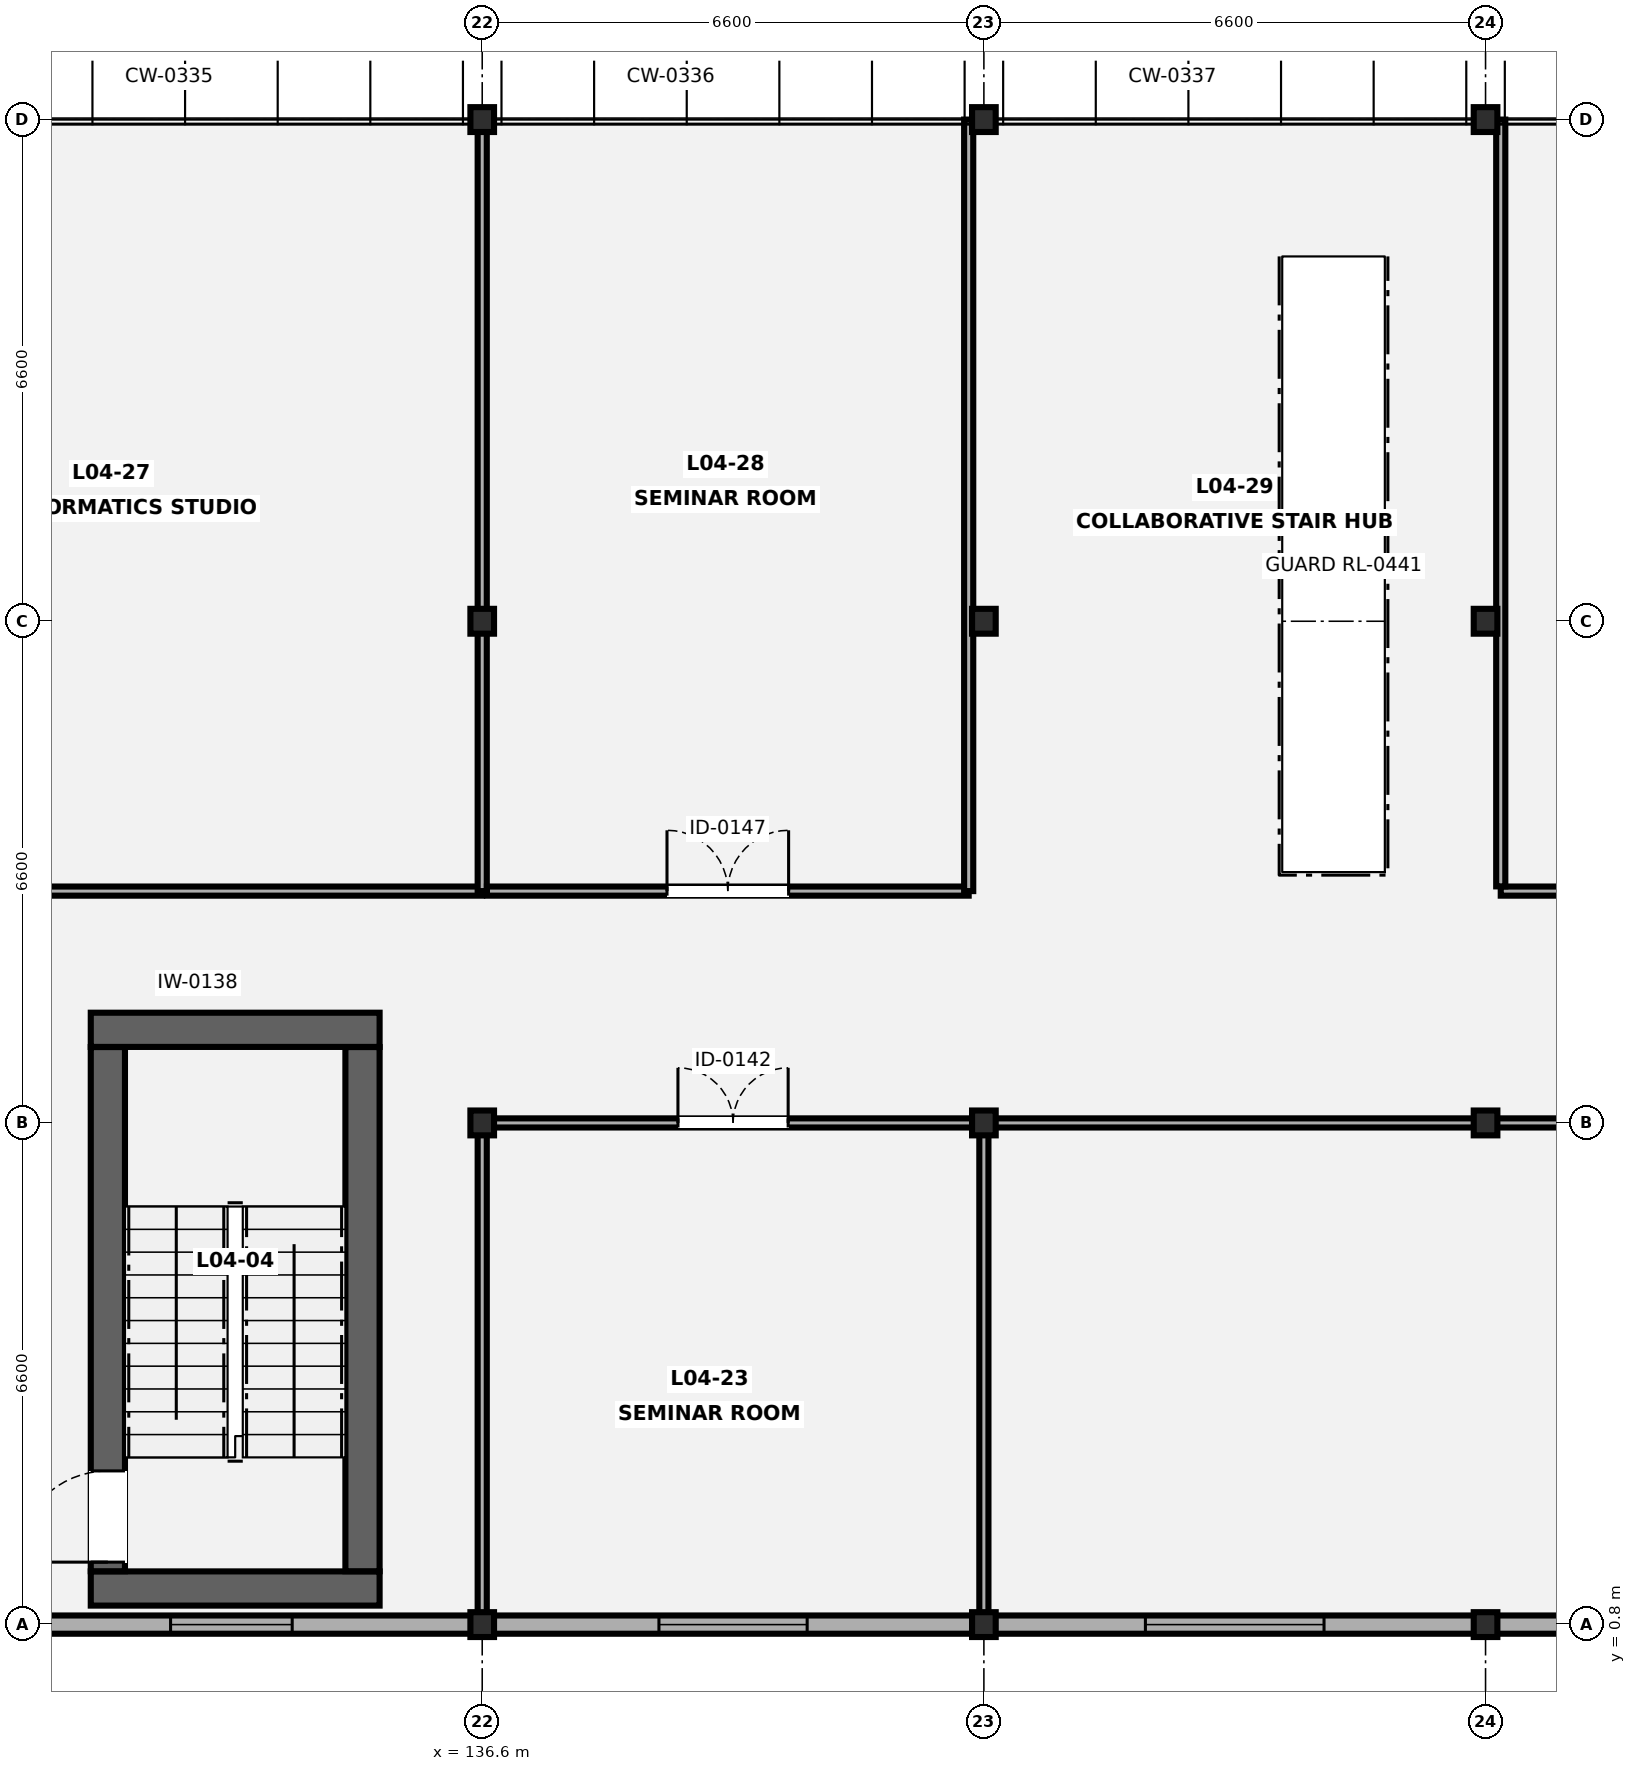
"""IFC4 building model, lengths in metres.
Left out: names, types, materials, properties, quantities, classifications, styles, units other than length and angle.
Written with IfcOpenShell. Run it as: python <this file> out.ifc"""

import sys

from ifc_helpers import new_model, si_unit, direction, frame, frame_2d, origin, origin_2d, place, context, subcontext, project, spatial, rectangle, i_section, extrude, element, fill, save


model = new_model("IFC4")
c1 = context("Model", 3, precision=1e-05, world=origin(), true_north=direction((0.0, 1.0)))
c2 = subcontext(c1, "Body", "Model", "MODEL_VIEW")
j1 = project(units=[si_unit("LENGTHUNIT", "METRE"), si_unit("PLANEANGLEUNIT", "RADIAN")], contexts=[c1])
p1 = place(None, origin())
s1 = spatial("IfcSite", under=j1, at=p1, CompositionType="ELEMENT")
p2 = place(p1, origin())
s2 = spatial("IfcBuilding", under=s1, at=p2, CompositionType="ELEMENT")
p3 = place(p2, frame((0.0, 0.0, 17.5)))
s3 = spatial("IfcBuildingStorey", under=s2, at=p3, CompositionType="ELEMENT", Elevation=17.5)
for number, where, z_axis, x_axis in (
    (1, (136.6, 0.8, 0.0), (0.0, 0.0, 1.0), (1.0, 0.0, 0.0)),
    (2, (136.6, 7.4, 0.0), (0.0, 0.0, 1.0), (1.0, 0.0, 0.0)),
    (3, (136.6, 14.0, 0.0), (0.0, 0.0, 1.0), (1.0, 0.0, 0.0)),
    (4, (136.6, 20.6, 0.0), (0.0, 0.0, 1.0), (1.0, 0.0, 0.0)),
    (5, (143.2, 0.8, 0.0), (0.0, 0.0, 1.0), (1.0, 0.0, 0.0)),
    (6, (143.2, 7.4, 0.0), (0.0, 0.0, 1.0), (1.0, 0.0, 0.0)),
    (7, (143.2, 14.0, 0.0), (0.0, 0.0, 1.0), (1.0, 0.0, 0.0)),
    (8, (143.2, 20.6, 0.0), (0.0, 0.0, 1.0), (1.0, 0.0, 0.0)),
    (9, (149.8, 0.8, 0.0), (0.0, 0.0, 1.0), (1.0, 0.0, 0.0)),
    (10, (149.8, 7.4, 0.0), (0.0, 0.0, 1.0), (1.0, 0.0, 0.0)),
    (11, (149.8, 14.0, 0.0), (0.0, 0.0, 1.0), (1.0, 0.0, 0.0)),
    (12, (149.8, 20.6, 0.0), (0.0, 0.0, 1.0), (1.0, 0.0, 0.0)),
):
    element("IfcColumn", number, at=place(p3, frame(where, z_axis=z_axis, x_axis=x_axis)), inside=s3, PredefinedType="COLUMN", context=c2, shape_type="SweptSolid", body=[
        extrude(i_section(OverallWidth=0.311, OverallDepth=0.327, WebThickness=0.016, FlangeThickness=0.025, FilletRadius=0.017, at=origin_2d()), origin(), (0.0, 0.0, 1.0), 4.2),
    ])
p4 = place(p3, frame((162.046, 0.8, 0.0), z_axis=(0.0, 0.0, 1.0), x_axis=(-1.0, 0.0, 0.0)))
e13 = element("IfcWall", 13, at=p4, inside=s3, PredefinedType="SOLIDWALL", context=c2, shape_type="SweptSolid", body=[
    extrude(rectangle(XDim=58.293, YDim=0.24, at=frame_2d((29.146, 0.0))), origin(), (0.0, 0.0, 1.0), 3.505),
])
p5 = place(p4, frame((53.896, 0.0, 0.85)))
e14 = element("IfcOpeningElement", 14, at=p5, cuts=e13, PredefinedType="OPENING", context=c2, shape_type="SweptSolid", body=[
    extrude(rectangle(XDim=2.5, YDim=1.25, at=frame_2d((1.25, 0.625))), frame((0.0, 0.13, 0.0), z_axis=(0.0, -1.0, 0.0), x_axis=(1.0, 0.0, 0.0)), (0.0, 0.0, 1.0), 0.26),
])
p6 = place(p4, frame((48.096, 0.0, 0.85)))
e15 = element("IfcOpeningElement", 15, at=p6, cuts=e13, PredefinedType="OPENING", context=c2, shape_type="SweptSolid", body=[
    extrude(rectangle(XDim=0.9, YDim=1.35, at=frame_2d((0.45, 0.675))), frame((0.0, 0.13, 0.0), z_axis=(0.0, -1.0, 0.0), x_axis=(1.0, 0.0, 0.0)), (0.0, 0.0, 1.0), 0.26),
])
p7 = place(p4, frame((41.421, 0.0, 0.85)))
e16 = element("IfcOpeningElement", 16, at=p7, cuts=e13, PredefinedType="OPENING", context=c2, shape_type="SweptSolid", body=[
    extrude(rectangle(XDim=1.05, YDim=1.35, at=frame_2d((0.525, 0.675))), frame((0.0, 0.13, 0.0), z_axis=(0.0, -1.0, 0.0), x_axis=(1.0, 0.0, 0.0)), (0.0, 0.0, 1.0), 0.26),
])
p8 = place(p4, frame((34.671, 0.0, 0.85)))
e17 = element("IfcOpeningElement", 17, at=p8, cuts=e13, PredefinedType="OPENING", context=c2, shape_type="SweptSolid", body=[
    extrude(rectangle(XDim=1.35, YDim=1.5, at=frame_2d((0.675, 0.75))), frame((0.0, 0.13, 0.0), z_axis=(0.0, -1.0, 0.0), x_axis=(1.0, 0.0, 0.0)), (0.0, 0.0, 1.0), 0.26),
])
p9 = place(p4, frame((27.947, 0.0, 0.85)))
e18 = element("IfcOpeningElement", 18, at=p9, cuts=e13, PredefinedType="OPENING", context=c2, shape_type="SweptSolid", body=[
    extrude(rectangle(XDim=1.6, YDim=1.5, at=frame_2d((0.8, 0.75))), frame((0.0, 0.13, 0.0), z_axis=(0.0, -1.0, 0.0), x_axis=(1.0, 0.0, 0.0)), (0.0, 0.0, 1.0), 0.26),
])
p10 = place(p4, frame((21.171, 0.0, 0.85)))
e19 = element("IfcOpeningElement", 19, at=p10, cuts=e13, PredefinedType="OPENING", context=c2, shape_type="SweptSolid", body=[
    extrude(rectangle(XDim=1.95, YDim=1.5, at=frame_2d((0.975, 0.75))), frame((0.0, 0.13, 0.0), z_axis=(0.0, -1.0, 0.0), x_axis=(1.0, 0.0, 0.0)), (0.0, 0.0, 1.0), 0.26),
])
p11 = place(p4, frame((14.372, 0.0, 0.85)))
e20 = element("IfcOpeningElement", 20, at=p11, cuts=e13, PredefinedType="OPENING", context=c2, shape_type="SweptSolid", body=[
    extrude(rectangle(XDim=2.35, YDim=1.5, at=frame_2d((1.175, 0.75))), frame((0.0, 0.13, 0.0), z_axis=(0.0, -1.0, 0.0), x_axis=(1.0, 0.0, 0.0)), (0.0, 0.0, 1.0), 0.26),
])
p12 = place(p4, frame((7.596, 0.0, 0.85)))
e21 = element("IfcOpeningElement", 21, at=p12, cuts=e13, PredefinedType="OPENING", context=c2, shape_type="SweptSolid", body=[
    extrude(rectangle(XDim=2.7, YDim=1.35, at=frame_2d((1.35, 0.675))), frame((0.0, 0.13, 0.0), z_axis=(0.0, -1.0, 0.0), x_axis=(1.0, 0.0, 0.0)), (0.0, 0.0, 1.0), 0.26),
])
p13 = place(p4, frame((1.296, 0.0, 0.85)))
e22 = element("IfcOpeningElement", 22, at=p13, cuts=e13, PredefinedType="OPENING", context=c2, shape_type="SweptSolid", body=[
    extrude(rectangle(XDim=2.9, YDim=1.35, at=frame_2d((1.45, 0.675))), frame((0.0, 0.13, 0.0), z_axis=(0.0, -1.0, 0.0), x_axis=(1.0, 0.0, 0.0)), (0.0, 0.0, 1.0), 0.26),
])
for number, where, z_axis, x_axis in (
    (23, (131.45, 1.275, 0.0), (0.0, 0.0, 1.0), (1.0, 0.0, 0.0)),
    (24, (131.45, 8.625, 0.0), (0.0, 0.0, 1.0), (1.0, 0.0, 0.0)),
):
    element("IfcWall", number, at=place(p3, frame(where, z_axis=z_axis, x_axis=x_axis)), inside=s3, PredefinedType="SHEAR", context=c2, shape_type="SweptSolid", body=[
        extrude(rectangle(XDim=3.8, YDim=0.45, at=frame_2d((1.9, 0.0))), origin(), (0.0, 0.0, 1.0), 4.02),
    ])
p14 = place(p3, frame((131.675, 1.502, 0.0), z_axis=(0.0, 0.0, 1.0), x_axis=(0.0, 1.0, 0.0)))
e25 = element("IfcWall", 25, at=p14, inside=s3, PredefinedType="SHEAR", context=c2, shape_type="SweptSolid", body=[
    extrude(rectangle(XDim=6.896, YDim=0.45, at=frame_2d((3.448, 0.0))), origin(), (0.0, 0.0, 1.0), 4.02),
])
p15 = place(p14, frame((0.12, 0.0, 0.0)))
e26 = element("IfcOpeningElement", 26, at=p15, cuts=e25, PredefinedType="OPENING", context=c2, shape_type="SweptSolid", body=[
    extrude(rectangle(XDim=1.2, YDim=2.15, at=frame_2d((0.6, 1.075))), frame((0.0, 0.235, 0.0), z_axis=(0.0, -1.0, 0.0), x_axis=(1.0, 0.0, 0.0)), (0.0, 0.0, 1.0), 0.47),
])
p16 = place(p3, frame((135.025, 1.502, 0.0), z_axis=(0.0, 0.0, 1.0), x_axis=(0.0, 1.0, 0.0)))
e27 = element("IfcWall", 27, at=p16, inside=s3, PredefinedType="SHEAR", context=c2, shape_type="SweptSolid", body=[
    extrude(rectangle(XDim=6.896, YDim=0.45, at=frame_2d((3.448, 0.0))), origin(), (0.0, 0.0, 1.0), 4.02),
])
p17 = place(p3, frame((136.6, 7.4, 0.0), z_axis=(0.0, 0.0, 1.0), x_axis=(1.0, 0.0, 0.0)))
e28 = element("IfcWall", 28, at=p17, inside=s3, PredefinedType="PARTITIONING", context=c2, shape_type="SweptSolid", body=[
    extrude(rectangle(XDim=6.6, YDim=0.12, at=frame_2d((3.3, 0.0))), origin(), (0.0, 0.0, 1.0), 3.293),
])
p18 = place(p17, frame((2.575, 0.0, 0.0)))
e29 = element("IfcOpeningElement", 29, at=p18, cuts=e28, PredefinedType="OPENING", context=c2, shape_type="SweptSolid", body=[
    extrude(rectangle(XDim=1.45, YDim=2.12, at=frame_2d((0.725, 1.06))), frame((0.0, 0.07, 0.0), z_axis=(0.0, -1.0, 0.0), x_axis=(1.0, 0.0, 0.0)), (0.0, 0.0, 1.0), 0.14),
])
p19 = place(p3, frame((136.6, 0.8, 0.0), z_axis=(0.0, 0.0, 1.0), x_axis=(0.0, 1.0, 0.0)))
e30 = element("IfcWall", 30, at=p19, inside=s3, PredefinedType="PARTITIONING", context=c2, shape_type="SweptSolid", body=[
    extrude(rectangle(XDim=6.538, YDim=0.12, at=frame_2d((3.269, 0.0))), origin(), (0.0, 0.0, 1.0), 3.372),
])
p20 = place(p3, frame((143.2, 0.8, 0.0), z_axis=(0.0, 0.0, 1.0), x_axis=(0.0, 1.0, 0.0)))
e31 = element("IfcWall", 31, at=p20, inside=s3, PredefinedType="PARTITIONING", context=c2, shape_type="SweptSolid", body=[
    extrude(rectangle(XDim=6.6, YDim=0.12, at=frame_2d((3.3, 0.0))), origin(), (0.0, 0.0, 1.0), 3.372),
])
p21 = place(p3, frame((143.202, 7.4, 0.0), z_axis=(0.0, 0.0, 1.0), x_axis=(1.0, 0.0, 0.0)))
e32 = element("IfcWall", 32, at=p21, inside=s3, PredefinedType="PARTITIONING", context=c2, shape_type="SweptSolid", body=[
    extrude(rectangle(XDim=18.998, YDim=0.12, at=frame_2d((9.499, 0.0))), origin(), (0.0, 0.0, 1.0), 3.293),
])
p22 = place(p21, frame((8.699, 0.0, 0.0)))
e33 = element("IfcOpeningElement", 33, at=p22, cuts=e32, PredefinedType="OPENING", context=c2, shape_type="SweptSolid", body=[
    extrude(rectangle(XDim=1.6, YDim=2.18, at=frame_2d((0.8, 1.09))), frame((0.0, 0.07, 0.0), z_axis=(0.0, -1.0, 0.0), x_axis=(1.0, 0.0, 0.0)), (0.0, 0.0, 1.0), 0.14),
])
p23 = place(p3, frame((123.462, 10.45, 0.0), z_axis=(0.0, 0.0, 1.0), x_axis=(1.0, 0.0, 0.0)))
e34 = element("IfcWall", 34, at=p23, inside=s3, PredefinedType="PARTITIONING", context=c2, shape_type="SweptSolid", body=[
    extrude(rectangle(XDim=13.138, YDim=0.12, at=frame_2d((6.569, 0.0))), origin(), (0.0, 0.0, 1.0), 3.546),
])
p24 = place(p23, frame((6.094, 0.0, 0.0)))
e35 = element("IfcOpeningElement", 35, at=p24, cuts=e34, PredefinedType="OPENING", context=c2, shape_type="SweptSolid", body=[
    extrude(rectangle(XDim=0.95, YDim=2.1, at=frame_2d((0.475, 1.05))), frame((0.0, 0.07, 0.0), z_axis=(0.0, -1.0, 0.0), x_axis=(1.0, 0.0, 0.0)), (0.0, 0.0, 1.0), 0.14),
])
p25 = place(p3, frame((136.6, 10.45, 0.0), z_axis=(0.0, 0.0, 1.0), x_axis=(0.0, 1.0, 0.0)))
e36 = element("IfcWall", 36, at=p25, inside=s3, PredefinedType="PARTITIONING", context=c2, shape_type="SweptSolid", body=[
    extrude(rectangle(XDim=10.15, YDim=0.12, at=frame_2d((5.075, 0.0))), origin(), (0.0, 0.0, 1.0), 3.372),
])
p26 = place(p3, frame((136.662, 10.45, 0.0), z_axis=(0.0, 0.0, 1.0), x_axis=(1.0, 0.0, 0.0)))
e37 = element("IfcWall", 37, at=p26, inside=s3, PredefinedType="PARTITIONING", context=c2, shape_type="SweptSolid", body=[
    extrude(rectangle(XDim=6.338, YDim=0.12, at=frame_2d((3.169, 0.0))), origin(), (0.0, 0.0, 1.0), 3.546),
])
p27 = place(p26, frame((2.369, 0.0, 0.0)))
e38 = element("IfcOpeningElement", 38, at=p27, cuts=e37, PredefinedType="OPENING", context=c2, shape_type="SweptSolid", body=[
    extrude(rectangle(XDim=1.6, YDim=2.18, at=frame_2d((0.8, 1.09))), frame((0.0, 0.07, 0.0), z_axis=(0.0, -1.0, 0.0), x_axis=(1.0, 0.0, 0.0)), (0.0, 0.0, 1.0), 0.14),
])
p28 = place(p3, frame((143.0, 10.45, 0.0), z_axis=(0.0, 0.0, 1.0), x_axis=(0.0, 1.0, 0.0)))
e39 = element("IfcWall", 39, at=p28, inside=s3, PredefinedType="PARTITIONING", context=c2, shape_type="SweptSolid", body=[
    extrude(rectangle(XDim=10.15, YDim=0.12, at=frame_2d((5.075, 0.0))), origin(), (0.0, 0.0, 1.0), 3.372),
])
p29 = place(p3, frame((150.0, 10.45, 0.0), z_axis=(0.0, 0.0, 1.0), x_axis=(1.0, 0.0, 0.0)))
e40 = element("IfcWall", 40, at=p29, inside=s3, PredefinedType="PARTITIONING", context=c2, shape_type="SweptSolid", body=[
    extrude(rectangle(XDim=12.2, YDim=0.12, at=frame_2d((6.1, 0.0))), origin(), (0.0, 0.0, 1.0), 3.546),
])
p30 = place(p29, frame((5.3, 0.0, 0.0)))
e41 = element("IfcOpeningElement", 41, at=p30, cuts=e40, PredefinedType="OPENING", context=c2, shape_type="SweptSolid", body=[
    extrude(rectangle(XDim=1.6, YDim=2.18, at=frame_2d((0.8, 1.09))), frame((0.0, 0.07, 0.0), z_axis=(0.0, -1.0, 0.0), x_axis=(1.0, 0.0, 0.0)), (0.0, 0.0, 1.0), 0.14),
])
p31 = place(p3, frame((150.0, 10.512, 0.0), z_axis=(0.0, 0.0, 1.0), x_axis=(0.0, 1.0, 0.0)))
e42 = element("IfcWall", 42, at=p31, inside=s3, PredefinedType="PARTITIONING", context=c2, shape_type="SweptSolid", body=[
    extrude(rectangle(XDim=10.088, YDim=0.12, at=frame_2d((5.044, 0.0))), origin(), (0.0, 0.0, 1.0), 3.372),
])
p32 = place(p9, origin())
e43 = element("IfcWindow", 43, at=p32, inside=s3, PartitioningType="SINGLE_PANEL", PredefinedType="WINDOW", context=c2, shape_type="SweptSolid", body=[
    extrude(rectangle(XDim=1.6, YDim=1.5, at=frame_2d((0.8, 0.75))), frame((0.0, 0.03, 0.0), z_axis=(0.0, -1.0, 0.0), x_axis=(1.0, 0.0, 0.0)), (0.0, 0.0, 1.0), 0.06),
])
fill(e18, e43)
p33 = place(p10, origin())
e44 = element("IfcWindow", 44, at=p33, inside=s3, PartitioningType="SINGLE_PANEL", PredefinedType="WINDOW", context=c2, shape_type="SweptSolid", body=[
    extrude(rectangle(XDim=1.95, YDim=1.5, at=frame_2d((0.975, 0.75))), frame((0.0, 0.03, 0.0), z_axis=(0.0, -1.0, 0.0), x_axis=(1.0, 0.0, 0.0)), (0.0, 0.0, 1.0), 0.06),
])
fill(e19, e44)
p34 = place(p11, origin())
e45 = element("IfcWindow", 45, at=p34, inside=s3, PartitioningType="SINGLE_PANEL", PredefinedType="WINDOW", context=c2, shape_type="SweptSolid", body=[
    extrude(rectangle(XDim=2.35, YDim=1.5, at=frame_2d((1.175, 0.75))), frame((0.0, 0.03, 0.0), z_axis=(0.0, -1.0, 0.0), x_axis=(1.0, 0.0, 0.0)), (0.0, 0.0, 1.0), 0.06),
])
fill(e20, e45)
p35 = place(p15, origin())
e46 = element("IfcDoor", 46, at=p35, inside=s3, OperationType="SINGLE_SWING_LEFT", PredefinedType="DOOR", context=c2, shape_type="SweptSolid", body=[
    extrude(rectangle(XDim=1.2, YDim=2.15, at=frame_2d((0.6, 1.075))), frame((0.0, 0.025, 0.0), z_axis=(0.0, -1.0, 0.0), x_axis=(1.0, 0.0, 0.0)), (0.0, 0.0, 1.0), 0.05),
])
fill(e26, e46)
p36 = place(p18, origin())
e47 = element("IfcDoor", 47, at=p36, inside=s3, OperationType="DOUBLE_DOOR_SINGLE_SWING", PredefinedType="DOOR", context=c2, shape_type="SweptSolid", body=[
    extrude(rectangle(XDim=1.45, YDim=2.12, at=frame_2d((0.725, 1.06))), frame((0.0, 0.025, 0.0), z_axis=(0.0, -1.0, 0.0), x_axis=(1.0, 0.0, 0.0)), (0.0, 0.0, 1.0), 0.05),
])
fill(e29, e47)
p37 = place(p27, origin())
e48 = element("IfcDoor", 48, at=p37, inside=s3, OperationType="DOUBLE_DOOR_SINGLE_SWING", PredefinedType="DOOR", context=c2, shape_type="SweptSolid", body=[
    extrude(rectangle(XDim=1.6, YDim=2.18, at=frame_2d((0.8, 1.09))), frame((0.0, 0.025, 0.0), z_axis=(0.0, -1.0, 0.0), x_axis=(1.0, 0.0, 0.0)), (0.0, 0.0, 1.0), 0.05),
])
fill(e38, e48)
save(model, sys.argv[1])
